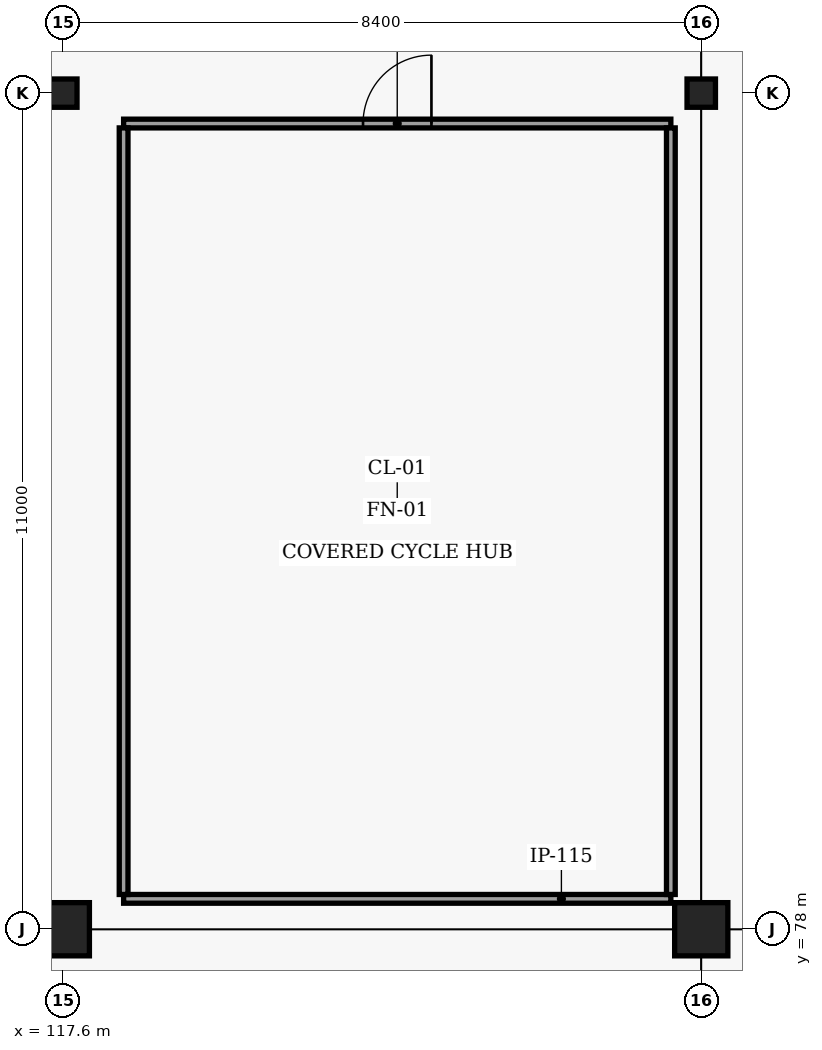
"""IFC4 building model, lengths in metres.
Left out: names, types, materials, properties, quantities, classifications, styles, units other than length and angle.
Written with IfcOpenShell. Run it as: python <this file> out.ifc"""

import sys

from ifc_helpers import new_model, si_unit, direction, frame, frame_2d, origin, origin_2d, place, context, subcontext, project, spatial, rectangle, i_section, extrude, element, fill, save


model = new_model("IFC4")
c1 = context("Model", 3, precision=1e-05, world=origin(), true_north=direction((0.0, 1.0)))
c2 = subcontext(c1, "Body", "Model", "MODEL_VIEW")
j1 = project(units=[si_unit("LENGTHUNIT", "METRE"), si_unit("PLANEANGLEUNIT", "RADIAN")], contexts=[c1])
p1 = place(None, origin())
s1 = spatial("IfcSite", under=j1, at=p1, CompositionType="ELEMENT")
p2 = place(p1, origin())
s2 = spatial("IfcBuilding", under=s1, at=p2, CompositionType="ELEMENT")
p3 = place(p2, origin())
s3 = spatial("IfcBuildingStorey", under=s2, at=p3, CompositionType="ELEMENT", Elevation=0.0)
for number, where, z_axis, x_axis in (
    (1, (117.6, 78.0, -0.45), (0.0, 0.0, 1.0), (1.0, 0.0, 0.0)),
    (2, (126.0, 78.0, -0.45), (0.0, 0.0, 1.0), (1.0, 0.0, 0.0)),
):
    element("IfcColumn", number, at=place(p3, frame(where, z_axis=z_axis, x_axis=x_axis)), inside=s3, PredefinedType="COLUMN", context=c2, shape_type="SweptSolid", body=[
        extrude(rectangle(XDim=0.7, YDim=0.7, at=origin_2d()), origin(), (0.0, 0.0, 1.0), 5.57),
    ])
for number, where, z_axis, x_axis in (
    (3, (117.6, 89.0, -0.45), (0.0, 0.0, 1.0), (1.0, 0.0, 0.0)),
    (4, (126.0, 89.0, -0.45), (0.0, 0.0, 1.0), (1.0, 0.0, 0.0)),
):
    element("IfcColumn", number, at=place(p3, frame(where, z_axis=z_axis, x_axis=x_axis)), inside=s3, PredefinedType="COLUMN", context=c2, shape_type="SweptSolid", body=[
        extrude(i_section(OverallWidth=0.374, OverallDepth=0.372, WebThickness=0.016, FlangeThickness=0.026, FilletRadius=0.016, at=origin_2d()), origin(), (0.0, 0.0, 1.0), 5.57),
    ])
p4 = place(p3, frame((118.4, 78.4, 0.0), z_axis=(0.0, 0.0, 1.0), x_axis=(1.0, 0.0, 0.0)))
e5 = element("IfcWall", 5, at=p4, inside=s3, PredefinedType="PARTITIONING", context=c2, shape_type="SweptSolid", body=[
    extrude(rectangle(XDim=7.2, YDim=0.115, at=frame_2d((3.6, 0.0))), origin(), (0.0, 0.0, 1.0), 5.1),
])
p5 = place(p3, frame((118.4, 88.6, 0.0), z_axis=(0.0, 0.0, 1.0), x_axis=(1.0, 0.0, 0.0)))
e6 = element("IfcWall", 6, at=p5, inside=s3, PredefinedType="PARTITIONING", context=c2, shape_type="SweptSolid", body=[
    extrude(rectangle(XDim=7.2, YDim=0.115, at=frame_2d((3.6, 0.0))), origin(), (0.0, 0.0, 1.0), 5.1),
])
p6 = place(p5, frame((3.15, 0.0, 0.0)))
e7 = element("IfcOpeningElement", 7, at=p6, cuts=e6, PredefinedType="OPENING", context=c2, shape_type="SweptSolid", body=[
    extrude(rectangle(XDim=0.9, YDim=2.15, at=frame_2d((0.45, 1.075))), frame((0.0, 0.067, 0.0), z_axis=(0.0, -1.0, 0.0), x_axis=(1.0, 0.0, 0.0)), (0.0, 0.0, 1.0), 0.135),
])
for number, where, z_axis, x_axis in (
    (8, (118.4, 78.458, 0.0), (0.0, 0.0, 1.0), (0.0, 1.0, 0.0)),
    (9, (125.6, 78.458, 0.0), (0.0, 0.0, 1.0), (0.0, 1.0, 0.0)),
):
    element("IfcWall", number, at=place(p3, frame(where, z_axis=z_axis, x_axis=x_axis)), inside=s3, PredefinedType="PARTITIONING", context=c2, shape_type="SweptSolid", body=[
        extrude(rectangle(XDim=10.085, YDim=0.115, at=frame_2d((5.042, 0.0))), origin(), (0.0, 0.0, 1.0), 4.807),
    ])
p7 = place(p6, origin())
e10 = element("IfcDoor", 10, at=p7, inside=s3, OperationType="SINGLE_SWING_RIGHT", PredefinedType="DOOR", context=c2, shape_type="SweptSolid", body=[
    extrude(rectangle(XDim=0.9, YDim=2.15, at=frame_2d((0.45, 1.075))), frame((0.0, 0.025, 0.0), z_axis=(0.0, -1.0, 0.0), x_axis=(1.0, 0.0, 0.0)), (0.0, 0.0, 1.0), 0.05),
])
fill(e7, e10)
save(model, sys.argv[1])
